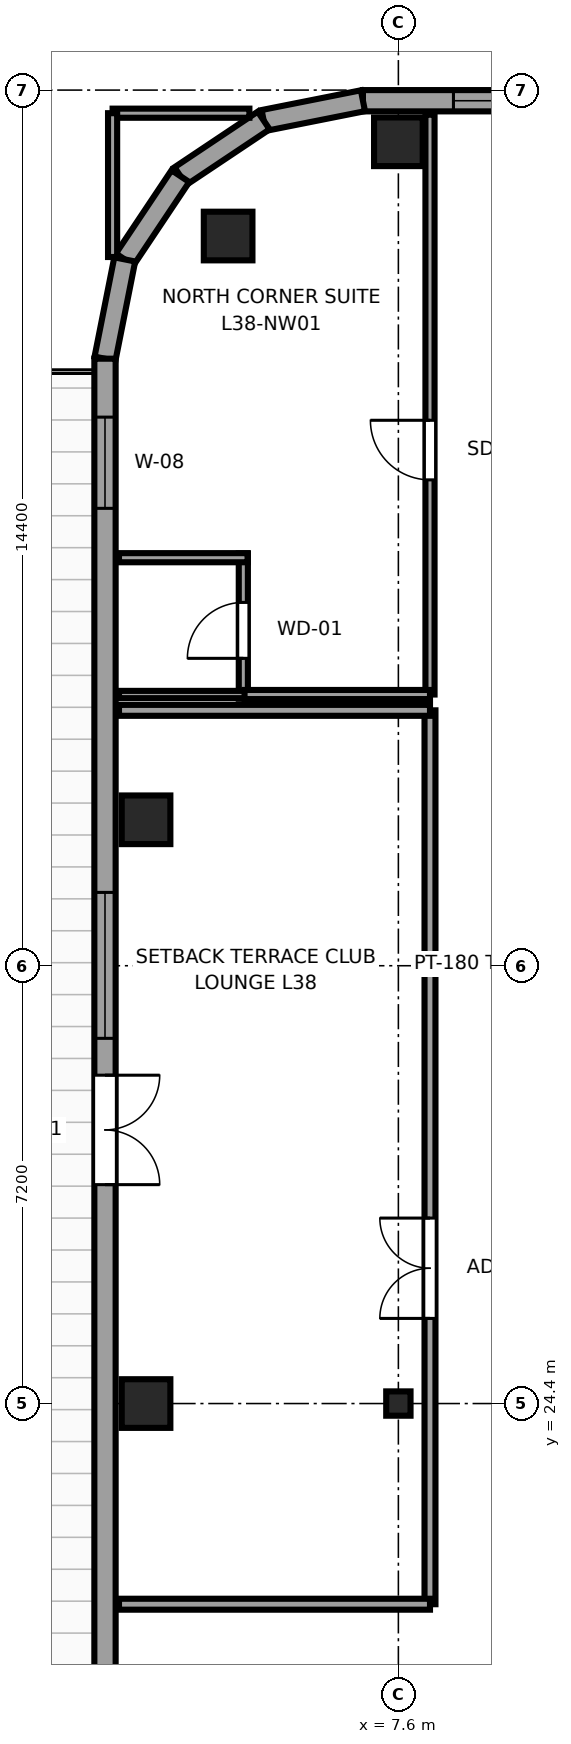
"""IFC4 building model, lengths in metres.
Left out: names, types, materials, properties, quantities, classifications, styles, units other than length and angle.
Written with IfcOpenShell. Run it as: python <this file> out.ifc"""

import sys

from ifc_helpers import new_model, si_unit, direction, frame, frame_2d, origin, origin_2d, place, context, subcontext, project, spatial, rectangle, i_section, extrude, source, transform, mapped, element, fill, save


model = new_model("IFC4")
c1 = context("Model", 3, precision=1e-05, world=origin(), true_north=direction((0.0, 1.0)))
c2 = subcontext(c1, "Body", "Model", "MODEL_VIEW")
j1 = project(units=[si_unit("LENGTHUNIT", "METRE"), si_unit("PLANEANGLEUNIT", "RADIAN")], contexts=[c1])
p1 = place(None, origin())
s1 = spatial("IfcSite", under=j1, at=p1, CompositionType="ELEMENT")
p2 = place(p1, origin())
s2 = spatial("IfcBuilding", under=s1, at=p2, CompositionType="ELEMENT")
p3 = place(p2, frame((0.0, 0.0, 147.05)))
s3 = spatial("IfcBuildingStorey", under=s2, at=p3, CompositionType="ELEMENT", Elevation=147.05)
m1 = source(origin(), c2, "Body", "SweptSolid", [
    extrude(rectangle(XDim=0.8, YDim=0.8, at=origin_2d()), origin(), (0.0, 0.0, 1.0), 3.55),
])
p4 = place(p3, frame((3.45, 24.4, 0.0), z_axis=(0.0, 0.0, 1.0), x_axis=(1.0, 0.0, 0.0)))
e1 = element("IfcColumn", 1, at=p4, inside=s3, PredefinedType="COLUMN", context=c2, shape_type="MappedRepresentation", body=[
    mapped(m1, transform((0.0, 0.0, 0.0), x_axis=(1.0, 0.0, 0.0), y_axis=(0.0, 1.0, 0.0), z_axis=(0.0, 0.0, 1.0), scale=1.0)),
])
m2 = source(origin(), c2, "Body", "SweptSolid", [
    extrude(i_section(OverallWidth=0.4, OverallDepth=0.4, WebThickness=0.02, FlangeThickness=0.035, at=origin_2d()), origin(), (0.0, 0.0, 1.0), 3.55),
])
p5 = place(p3, frame((7.6, 24.4, 0.0), z_axis=(0.0, 0.0, 1.0), x_axis=(1.0, 0.0, 0.0)))
e2 = element("IfcColumn", 2, at=p5, inside=s3, PredefinedType="COLUMN", context=c2, shape_type="MappedRepresentation", body=[
    mapped(m2, transform((0.0, 0.0, 0.0), x_axis=(1.0, 0.0, 0.0), y_axis=(0.0, 1.0, 0.0), z_axis=(0.0, 0.0, 1.0), scale=1.0)),
])
for number, where, z_axis, x_axis in (
    (3, (4.8, 43.6, 0.0), (0.0, 0.0, 1.0), (1.0, 0.0, 0.0)),
    (4, (7.6, 45.15, 0.0), (0.0, 0.0, 1.0), (1.0, 0.0, 0.0)),
    (5, (3.45, 34.0, 0.0), (0.0, 0.0, 1.0), (1.0, 0.0, 0.0)),
):
    element("IfcColumn", number, at=place(p3, frame(where, z_axis=z_axis, x_axis=x_axis)), inside=s3, PredefinedType="COLUMN", context=c2, shape_type="MappedRepresentation", body=[
        mapped(m1, transform((0.0, 0.0, 0.0), x_axis=(1.0, 0.0, 0.0), y_axis=(0.0, 1.0, 0.0), z_axis=(0.0, 0.0, 1.0), scale=1.0)),
    ])
p6 = place(p3, frame((49.983, 45.825, 0.0), z_axis=(0.0, 0.0, 1.0), x_axis=(-1.0, 0.0, 0.0)))
e6 = element("IfcWall", 6, at=p6, inside=s3, PredefinedType="SOLIDWALL", context=c2, shape_type="SweptSolid", body=[
    extrude(rectangle(XDim=42.966, YDim=0.35, at=frame_2d((21.483, 0.0))), origin(), (0.0, 0.0, 1.0), 3.37),
])
p7 = place(p6, frame((1.488, 0.0, 0.68)))
e7 = element("IfcOpeningElement", 7, at=p7, cuts=e6, PredefinedType="OPENING", context=c2, shape_type="SweptSolid", body=[
    extrude(rectangle(XDim=2.4, YDim=1.9, at=frame_2d((1.2, 0.95))), frame((0.0, 0.185, 0.0), z_axis=(0.0, -1.0, 0.0), x_axis=(1.0, 0.0, 0.0)), (0.0, 0.0, 1.0), 0.37),
])
p8 = place(p6, frame((9.841, 0.0, 0.68)))
e8 = element("IfcOpeningElement", 8, at=p8, cuts=e6, PredefinedType="OPENING", context=c2, shape_type="SweptSolid", body=[
    extrude(rectangle(XDim=2.4, YDim=1.9, at=frame_2d((1.2, 0.95))), frame((0.0, 0.185, 0.0), z_axis=(0.0, -1.0, 0.0), x_axis=(1.0, 0.0, 0.0)), (0.0, 0.0, 1.0), 0.37),
])
p9 = place(p6, frame((14.018, 0.0, 0.68)))
e9 = element("IfcOpeningElement", 9, at=p9, cuts=e6, PredefinedType="OPENING", context=c2, shape_type="SweptSolid", body=[
    extrude(rectangle(XDim=2.4, YDim=1.9, at=frame_2d((1.2, 0.95))), frame((0.0, 0.185, 0.0), z_axis=(0.0, -1.0, 0.0), x_axis=(1.0, 0.0, 0.0)), (0.0, 0.0, 1.0), 0.37),
])
p10 = place(p6, frame((18.195, 0.0, 0.68)))
e10 = element("IfcOpeningElement", 10, at=p10, cuts=e6, PredefinedType="OPENING", context=c2, shape_type="SweptSolid", body=[
    extrude(rectangle(XDim=2.4, YDim=1.9, at=frame_2d((1.2, 0.95))), frame((0.0, 0.185, 0.0), z_axis=(0.0, -1.0, 0.0), x_axis=(1.0, 0.0, 0.0)), (0.0, 0.0, 1.0), 0.37),
])
p11 = place(p6, frame((22.371, 0.0, 0.68)))
e11 = element("IfcOpeningElement", 11, at=p11, cuts=e6, PredefinedType="OPENING", context=c2, shape_type="SweptSolid", body=[
    extrude(rectangle(XDim=2.4, YDim=1.9, at=frame_2d((1.2, 0.95))), frame((0.0, 0.185, 0.0), z_axis=(0.0, -1.0, 0.0), x_axis=(1.0, 0.0, 0.0)), (0.0, 0.0, 1.0), 0.37),
])
p12 = place(p6, frame((26.548, 0.0, 0.68)))
e12 = element("IfcOpeningElement", 12, at=p12, cuts=e6, PredefinedType="OPENING", context=c2, shape_type="SweptSolid", body=[
    extrude(rectangle(XDim=2.4, YDim=1.9, at=frame_2d((1.2, 0.95))), frame((0.0, 0.185, 0.0), z_axis=(0.0, -1.0, 0.0), x_axis=(1.0, 0.0, 0.0)), (0.0, 0.0, 1.0), 0.37),
])
p13 = place(p6, frame((30.724, 0.0, 0.68)))
e13 = element("IfcOpeningElement", 13, at=p13, cuts=e6, PredefinedType="OPENING", context=c2, shape_type="SweptSolid", body=[
    extrude(rectangle(XDim=2.4, YDim=1.9, at=frame_2d((1.2, 0.95))), frame((0.0, 0.185, 0.0), z_axis=(0.0, -1.0, 0.0), x_axis=(1.0, 0.0, 0.0)), (0.0, 0.0, 1.0), 0.37),
])
p14 = place(p6, frame((34.901, 0.0, 0.68)))
e14 = element("IfcOpeningElement", 14, at=p14, cuts=e6, PredefinedType="OPENING", context=c2, shape_type="SweptSolid", body=[
    extrude(rectangle(XDim=2.4, YDim=1.9, at=frame_2d((1.2, 0.95))), frame((0.0, 0.185, 0.0), z_axis=(0.0, -1.0, 0.0), x_axis=(1.0, 0.0, 0.0)), (0.0, 0.0, 1.0), 0.37),
])
p15 = place(p6, frame((39.077, 0.0, 0.68)))
e15 = element("IfcOpeningElement", 15, at=p15, cuts=e6, PredefinedType="OPENING", context=c2, shape_type="SweptSolid", body=[
    extrude(rectangle(XDim=2.4, YDim=1.9, at=frame_2d((1.2, 0.95))), frame((0.0, 0.185, 0.0), z_axis=(0.0, -1.0, 0.0), x_axis=(1.0, 0.0, 0.0)), (0.0, 0.0, 1.0), 0.37),
])
p16 = place(p3, frame((7.017, 45.825, 0.0), z_axis=(0.0, 0.0, 1.0), x_axis=(-0.980788844421, -0.195072403631, 0.0)))
e16 = element("IfcWall", 16, at=p16, inside=s3, PredefinedType="SOLIDWALL", context=c2, shape_type="SweptSolid", body=[
    extrude(rectangle(XDim=1.665, YDim=0.35, at=frame_2d((0.832, 0.0))), origin(), (0.0, 0.0, 1.0), 3.37),
])
for number, where, z_axis, x_axis in (
    (17, (5.385, 45.5, 0.0), (0.0, 0.0, 1.0), (-0.832, -0.556, 0.0)),
    (18, (4.015, 44.585, 0.0), (0.0, 0.0, 1.0), (-0.556, -0.831, 0.0)),
):
    element("IfcWall", number, at=place(p3, frame(where, z_axis=z_axis, x_axis=x_axis)), inside=s3, PredefinedType="SOLIDWALL", context=c2, shape_type="SweptSolid", body=[
        extrude(rectangle(XDim=1.647, YDim=0.35, at=frame_2d((0.824, 0.0))), origin(), (0.0, 0.0, 1.0), 2.832),
    ])
p17 = place(p3, frame((3.1, 43.216, 0.0), z_axis=(0.0, 0.0, 1.0), x_axis=(-0.195044345786, -0.980794424524, 0.0)))
e19 = element("IfcWall", 19, at=p17, inside=s3, PredefinedType="SOLIDWALL", context=c2, shape_type="SweptSolid", body=[
    extrude(rectangle(XDim=1.665, YDim=0.35, at=frame_2d((0.833, 0.0))), origin(), (0.0, 0.0, 1.0), 3.37),
])
p18 = place(p3, frame((2.775, 41.583, 0.0), z_axis=(0.0, 0.0, 1.0), x_axis=(0.0, -1.0, 0.0)))
e20 = element("IfcWall", 20, at=p18, inside=s3, PredefinedType="SOLIDWALL", context=c2, shape_type="SweptSolid", body=[
    extrude(rectangle(XDim=34.566, YDim=0.35, at=frame_2d((17.283, 0.0))), origin(), (0.0, 0.0, 1.0), 3.37),
])
p19 = place(p18, frame((13.583, 0.0, 0.0), z_axis=(0.0, 0.0, 1.0), x_axis=(-1.0, 0.0, 0.0)))
e21 = element("IfcOpeningElement", 21, at=p19, cuts=e20, PredefinedType="OPENING", context=c2, shape_type="SweptSolid", body=[
    extrude(rectangle(XDim=1.8, YDim=2.15, at=frame_2d((0.9, 1.075))), frame((0.0, 0.185, 0.0), z_axis=(0.0, -1.0, 0.0), x_axis=(1.0, 0.0, 0.0)), (0.0, 0.0, 1.0), 0.37),
])
p20 = place(p18, frame((8.777, 0.0, 0.68)))
e22 = element("IfcOpeningElement", 22, at=p20, cuts=e20, PredefinedType="OPENING", context=c2, shape_type="SweptSolid", body=[
    extrude(rectangle(XDim=2.4, YDim=1.9, at=frame_2d((1.2, 0.95))), frame((0.0, 0.185, 0.0), z_axis=(0.0, -1.0, 0.0), x_axis=(1.0, 0.0, 0.0)), (0.0, 0.0, 1.0), 0.37),
])
p21 = place(p18, frame((26.51, 0.0, 0.68)))
e23 = element("IfcOpeningElement", 23, at=p21, cuts=e20, PredefinedType="OPENING", context=c2, shape_type="SweptSolid", body=[
    extrude(rectangle(XDim=2.4, YDim=1.9, at=frame_2d((1.2, 0.95))), frame((0.0, 0.185, 0.0), z_axis=(0.0, -1.0, 0.0), x_axis=(1.0, 0.0, 0.0)), (0.0, 0.0, 1.0), 0.37),
])
p22 = place(p18, frame((31.779, 0.0, 0.62)))
e24 = element("IfcOpeningElement", 24, at=p22, cuts=e20, PredefinedType="OPENING", context=c2, shape_type="SweptSolid", body=[
    extrude(rectangle(XDim=1.5, YDim=1.55, at=frame_2d((0.75, 0.775))), frame((0.0, 0.185, 0.0), z_axis=(0.0, -1.0, 0.0), x_axis=(1.0, 0.0, 0.0)), (0.0, 0.0, 1.0), 0.37),
])
p23 = place(p18, frame((0.961, 0.0, 0.62)))
e25 = element("IfcOpeningElement", 25, at=p23, cuts=e20, PredefinedType="OPENING", context=c2, shape_type="SweptSolid", body=[
    extrude(rectangle(XDim=1.5, YDim=1.55, at=frame_2d((0.75, 0.775))), frame((0.0, 0.185, 0.0), z_axis=(0.0, -1.0, 0.0), x_axis=(1.0, 0.0, 0.0)), (0.0, 0.0, 1.0), 0.37),
])
p24 = place(p3, frame((5.05, 35.99, 0.0), z_axis=(0.0, 0.0, 1.0), x_axis=(0.0, 1.0, 0.0)))
e26 = element("IfcWall", 26, at=p24, inside=s3, PredefinedType="PARTITIONING", context=c2, shape_type="SweptSolid", body=[
    extrude(rectangle(XDim=2.39, YDim=0.15, at=frame_2d((1.195, 0.0))), origin(), (0.0, 0.0, 1.0), 3.37),
])
p25 = place(p24, frame((0.665, 0.0, 0.0)))
e27 = element("IfcOpeningElement", 27, at=p25, cuts=e26, PredefinedType="OPENING", context=c2, shape_type="SweptSolid", body=[
    extrude(rectangle(XDim=0.92, YDim=2.01, at=frame_2d((0.46, 1.005))), frame((0.0, 0.085, 0.0), z_axis=(0.0, -1.0, 0.0), x_axis=(1.0, 0.0, 0.0)), (0.0, 0.0, 1.0), 0.17),
])
p26 = place(p3, frame((3.005, 36.06, 0.0), z_axis=(0.0, 0.0, 1.0), x_axis=(1.0, 0.0, 0.0)))
e28 = element("IfcWall", 28, at=p26, inside=s3, PredefinedType="PLUMBINGWALL", context=c2, shape_type="SweptSolid", body=[
    extrude(rectangle(XDim=2.115, YDim=0.12, at=frame_2d((1.058, 0.0))), origin(), (0.0, 0.0, 1.0), 3.37),
])
p27 = place(p3, frame((3.005, 38.31, 0.0), z_axis=(0.0, 0.0, 1.0), x_axis=(1.0, 0.0, 0.0)))
e29 = element("IfcWall", 29, at=p27, inside=s3, PredefinedType="PARTITIONING", context=c2, shape_type="SweptSolid", body=[
    extrude(rectangle(XDim=2.115, YDim=0.15, at=frame_2d((1.058, 0.0))), origin(), (0.0, 0.0, 1.0), 3.37),
])
p28 = place(p3, frame((8.12, 21.1, 0.0), z_axis=(0.0, 0.0, 1.0), x_axis=(0.0, 1.0, 0.0)))
e30 = element("IfcWall", 30, at=p28, inside=s3, PredefinedType="PARTITIONING", context=c2, shape_type="SweptSolid", body=[
    extrude(rectangle(XDim=14.7, YDim=0.18, at=frame_2d((7.35, 0.0))), origin(), (0.0, 0.0, 1.0), 3.37),
])
p29 = place(p28, frame((4.7, 0.0, 0.0)))
e31 = element("IfcOpeningElement", 31, at=p29, cuts=e30, PredefinedType="OPENING", context=c2, shape_type="SweptSolid", body=[
    extrude(rectangle(XDim=1.65, YDim=2.15, at=frame_2d((0.825, 1.075))), frame((0.0, 0.1, 0.0), z_axis=(0.0, -1.0, 0.0), x_axis=(1.0, 0.0, 0.0)), (0.0, 0.0, 1.0), 0.2),
])
for number, where, z_axis, x_axis in (
    (32, (3.005, 21.1, 0.0), (0.0, 0.0, 1.0), (1.0, 0.0, 0.0)),
    (33, (3.005, 35.8, 0.0), (0.0, 0.0, 1.0), (1.0, 0.0, 0.0)),
):
    element("IfcWall", number, at=place(p3, frame(where, z_axis=z_axis, x_axis=x_axis)), inside=s3, PredefinedType="PARTITIONING", context=c2, shape_type="SweptSolid", body=[
        extrude(rectangle(XDim=5.115, YDim=0.18, at=frame_2d((2.558, 0.0))), origin(), (0.0, 0.0, 1.0), 3.37),
    ])
p30 = place(p3, frame((8.12, 36.06, 0.0), z_axis=(0.0, 0.0, 1.0), x_axis=(0.0, 1.0, 0.0)))
e34 = element("IfcWall", 34, at=p30, inside=s3, PredefinedType="PARTITIONING", context=c2, shape_type="SweptSolid", body=[
    extrude(rectangle(XDim=9.535, YDim=0.15, at=frame_2d((4.768, 0.0))), origin(), (0.0, 0.0, 1.0), 3.37),
])
p31 = place(p30, frame((3.53, 0.0, 0.0)))
e35 = element("IfcOpeningElement", 35, at=p31, cuts=e34, PredefinedType="OPENING", context=c2, shape_type="SweptSolid", body=[
    extrude(rectangle(XDim=0.98, YDim=2.12, at=frame_2d((0.49, 1.06))), frame((0.0, 0.085, 0.0), z_axis=(0.0, -1.0, 0.0), x_axis=(1.0, 0.0, 0.0)), (0.0, 0.0, 1.0), 0.17),
])
p32 = place(p3, frame((5.07, 36.06, 0.0), z_axis=(0.0, 0.0, 1.0), x_axis=(1.0, 0.0, 0.0)))
e36 = element("IfcWall", 36, at=p32, inside=s3, PredefinedType="PARTITIONING", context=c2, shape_type="SweptSolid", body=[
    extrude(rectangle(XDim=3.05, YDim=0.15, at=frame_2d((1.525, 0.0))), origin(), (0.0, 0.0, 1.0), 3.37),
])
p33 = place(p3, frame((2.9, 45.62, 0.0), z_axis=(0.0, 0.0, 1.0), x_axis=(1.0, 0.0, 0.0)))
e37 = element("IfcWall", 37, at=p33, inside=s3, PredefinedType="PARTITIONING", context=c2, shape_type="SweptSolid", body=[
    extrude(rectangle(XDim=2.25, YDim=0.15, at=frame_2d((1.125, 0.0))), origin(), (0.0, 0.0, 1.0), 3.37),
])
p34 = place(p3, frame((2.9, 43.255, 0.0), z_axis=(0.0, 0.0, 1.0), x_axis=(0.0, 1.0, 0.0)))
e38 = element("IfcWall", 38, at=p34, inside=s3, PredefinedType="PARTITIONING", context=c2, shape_type="SweptSolid", body=[
    extrude(rectangle(XDim=2.365, YDim=0.15, at=frame_2d((1.183, 0.0))), origin(), (0.0, 0.0, 1.0), 3.37),
])
m3 = source(origin(), c2, "Body", "SweptSolid", [
    extrude(rectangle(XDim=2.4, YDim=1.9, at=frame_2d((1.2, 0.95))), frame((0.0, 0.09, 0.0), z_axis=(0.0, -1.0, 0.0), x_axis=(1.0, 0.0, 0.0)), (0.0, 0.0, 1.0), 0.06),
])
p35 = place(p15, origin())
e39 = element("IfcWindow", 39, at=p35, inside=s3, PartitioningType="TRIPLE_PANEL_HORIZONTAL", PredefinedType="WINDOW", context=c2, shape_type="MappedRepresentation", body=[
    mapped(m3, transform((0.0, 0.0, 0.0), x_axis=(1.0, 0.0, 0.0), y_axis=(0.0, 1.0, 0.0), z_axis=(0.0, 0.0, 1.0), scale=1.0)),
])
fill(e15, e39)
m4 = source(origin(), c2, "Body", "SweptSolid", [
    extrude(rectangle(XDim=1.8, YDim=2.15, at=frame_2d((0.9, 1.075))), frame((0.0, 0.025, 0.0), z_axis=(0.0, -1.0, 0.0), x_axis=(1.0, 0.0, 0.0)), (0.0, 0.0, 1.0), 0.05),
])
p36 = place(p19, origin())
e40 = element("IfcDoor", 40, at=p36, inside=s3, OperationType="DOUBLE_DOOR_SINGLE_SWING", PredefinedType="DOOR", context=c2, shape_type="MappedRepresentation", body=[
    mapped(m4, transform((0.0, 0.0, 0.0), x_axis=(1.0, 0.0, 0.0), y_axis=(0.0, 1.0, 0.0), z_axis=(0.0, 0.0, 1.0), scale=1.0)),
])
fill(e21, e40)
p37 = place(p20, origin())
e41 = element("IfcWindow", 41, at=p37, inside=s3, PartitioningType="TRIPLE_PANEL_HORIZONTAL", PredefinedType="WINDOW", context=c2, shape_type="MappedRepresentation", body=[
    mapped(m3, transform((0.0, 0.0, 0.0), x_axis=(1.0, 0.0, 0.0), y_axis=(0.0, 1.0, 0.0), z_axis=(0.0, 0.0, 1.0), scale=1.0)),
])
fill(e22, e41)
m5 = source(origin(), c2, "Body", "SweptSolid", [
    extrude(rectangle(XDim=1.5, YDim=1.55, at=frame_2d((0.75, 0.775))), frame((0.0, 0.09, 0.0), z_axis=(0.0, -1.0, 0.0), x_axis=(1.0, 0.0, 0.0)), (0.0, 0.0, 1.0), 0.06),
])
p38 = place(p23, origin())
e42 = element("IfcWindow", 42, at=p38, inside=s3, PartitioningType="SINGLE_PANEL", PredefinedType="WINDOW", context=c2, shape_type="MappedRepresentation", body=[
    mapped(m5, transform((0.0, 0.0, 0.0), x_axis=(1.0, 0.0, 0.0), y_axis=(0.0, 1.0, 0.0), z_axis=(0.0, 0.0, 1.0), scale=1.0)),
])
fill(e25, e42)
m6 = source(origin(), c2, "Body", "SweptSolid", [
    extrude(rectangle(XDim=0.92, YDim=2.01, at=frame_2d((0.46, 1.005))), frame((0.0, 0.025, 0.0), z_axis=(0.0, -1.0, 0.0), x_axis=(1.0, 0.0, 0.0)), (0.0, 0.0, 1.0), 0.05),
])
p39 = place(p25, origin())
e43 = element("IfcDoor", 43, at=p39, inside=s3, OperationType="SINGLE_SWING_LEFT", PredefinedType="DOOR", context=c2, shape_type="MappedRepresentation", body=[
    mapped(m6, transform((0.0, 0.0, 0.0), x_axis=(1.0, 0.0, 0.0), y_axis=(0.0, 1.0, 0.0), z_axis=(0.0, 0.0, 1.0), scale=1.0)),
])
fill(e27, e43)
m7 = source(origin(), c2, "Body", "SweptSolid", [
    extrude(rectangle(XDim=1.65, YDim=2.15, at=frame_2d((0.825, 1.075))), frame((0.0, 0.025, 0.0), z_axis=(0.0, -1.0, 0.0), x_axis=(1.0, 0.0, 0.0)), (0.0, 0.0, 1.0), 0.05),
])
p40 = place(p29, origin())
e44 = element("IfcDoor", 44, at=p40, inside=s3, OperationType="DOUBLE_DOOR_SINGLE_SWING", PredefinedType="DOOR", context=c2, shape_type="MappedRepresentation", body=[
    mapped(m7, transform((0.0, 0.0, 0.0), x_axis=(1.0, 0.0, 0.0), y_axis=(0.0, 1.0, 0.0), z_axis=(0.0, 0.0, 1.0), scale=1.0)),
])
fill(e31, e44)
m8 = source(origin(), c2, "Body", "SweptSolid", [
    extrude(rectangle(XDim=0.98, YDim=2.12, at=frame_2d((0.49, 1.06))), frame((0.0, 0.025, 0.0), z_axis=(0.0, -1.0, 0.0), x_axis=(1.0, 0.0, 0.0)), (0.0, 0.0, 1.0), 0.05),
])
p41 = place(p31, origin())
e45 = element("IfcDoor", 45, at=p41, inside=s3, OperationType="SINGLE_SWING_RIGHT", PredefinedType="DOOR", context=c2, shape_type="MappedRepresentation", body=[
    mapped(m8, transform((0.0, 0.0, 0.0), x_axis=(1.0, 0.0, 0.0), y_axis=(0.0, 1.0, 0.0), z_axis=(0.0, 0.0, 1.0), scale=1.0)),
])
fill(e35, e45)
save(model, sys.argv[1])
